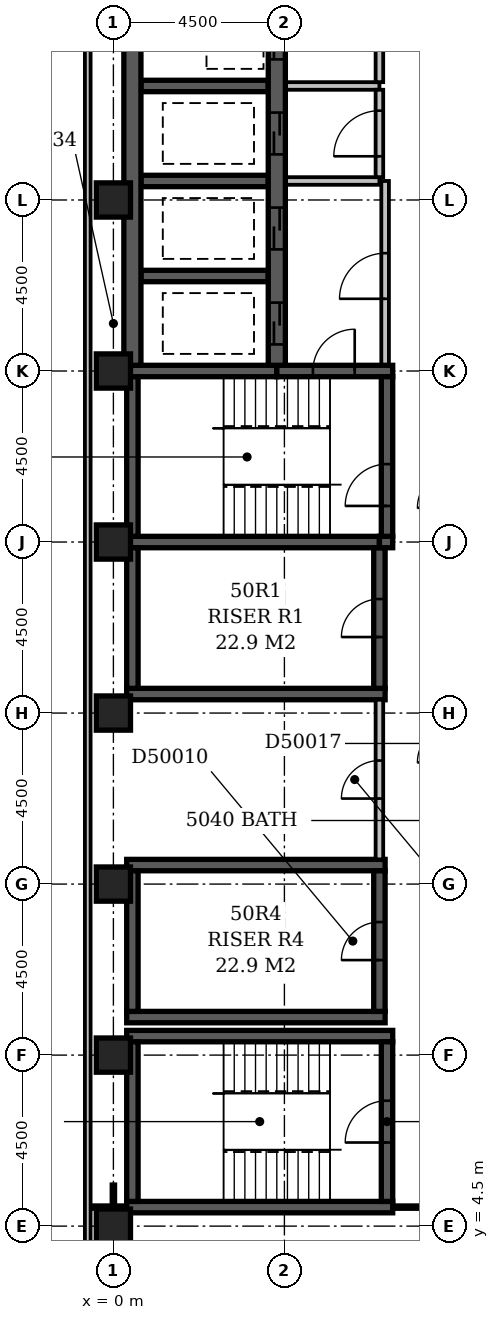
"""IFC4 building model, lengths in metres.
Left out: names, types, materials, properties, quantities, classifications, styles, units other than length and angle.
Written with IfcOpenShell. Run it as: python <this file> out.ifc"""

import sys

from ifc_helpers import new_model, si_unit, direction, frame, frame_2d, origin, origin_2d, place, context, subcontext, project, spatial, rectangle, extrude, element, fill, save


model = new_model("IFC4")
c1 = context("Model", 3, precision=1e-05, world=origin(), true_north=direction((0.0, 1.0)))
c2 = subcontext(c1, "Body", "Model", "MODEL_VIEW")
j1 = project(units=[si_unit("LENGTHUNIT", "METRE"), si_unit("PLANEANGLEUNIT", "RADIAN")], contexts=[c1])
p1 = place(None, origin())
s1 = spatial("IfcSite", under=j1, at=p1, CompositionType="ELEMENT")
p2 = place(p1, origin())
s2 = spatial("IfcBuilding", under=s1, at=p2, CompositionType="ELEMENT")
p3 = place(p2, frame((0.0, 0.0, 197.0)))
s3 = spatial("IfcBuildingStorey", under=s2, at=p3, CompositionType="ELEMENT", Elevation=197.0)
for number, where, z_axis, x_axis in (
    (1, (0.35, 5.0, -0.3), (0.0, 0.0, 1.0), (1.0, 0.0, 0.0)),
    (2, (0.35, 9.5, -0.3), (0.0, 0.0, 1.0), (1.0, 0.0, 0.0)),
):
    element("IfcWall", number, at=place(p3, frame(where, z_axis=z_axis, x_axis=x_axis)), inside=s3, PredefinedType="SHEAR", context=c2, shape_type="SweptSolid", body=[
        extrude(rectangle(XDim=7.0, YDim=0.3, at=frame_2d((3.5, 0.0))), origin(), (0.0, 0.0, 1.0), 3.6),
    ])
for number, where, z_axis, x_axis in (
    (3, (0.35, 10.0, -0.3), (0.0, 0.0, 1.0), (1.0, 0.0, 0.0)),
    (4, (0.35, 14.0, -0.3), (0.0, 0.0, 1.0), (1.0, 0.0, 0.0)),
    (5, (0.35, 18.5, -0.3), (0.0, 0.0, 1.0), (1.0, 0.0, 0.0)),
):
    element("IfcWall", number, at=place(p3, frame(where, z_axis=z_axis, x_axis=x_axis)), inside=s3, PredefinedType="SHEAR", context=c2, shape_type="SweptSolid", body=[
        extrude(rectangle(XDim=6.8, YDim=0.3, at=frame_2d((3.4, 0.0))), origin(), (0.0, 0.0, 1.0), 3.6),
    ])
p4 = place(p3, frame((0.35, 22.5, -0.3), z_axis=(0.0, 0.0, 1.0), x_axis=(1.0, 0.0, 0.0)))
e6 = element("IfcWall", 6, at=p4, inside=s3, PredefinedType="SHEAR", context=c2, shape_type="SweptSolid", body=[
    extrude(rectangle(XDim=6.65, YDim=0.3, at=frame_2d((3.325, 0.0))), origin(), (0.0, 0.0, 1.0), 3.6),
])
p5 = place(p3, frame((0.35, 27.0, -0.3), z_axis=(0.0, 0.0, 1.0), x_axis=(1.0, 0.0, 0.0)))
e7 = element("IfcWall", 7, at=p5, inside=s3, PredefinedType="SHEAR", context=c2, shape_type="SweptSolid", body=[
    extrude(rectangle(XDim=3.95, YDim=0.3, at=frame_2d((1.975, 0.0))), origin(), (0.0, 0.0, 1.0), 3.6),
])
p6 = place(p3, frame((0.5, 5.15, -0.3), z_axis=(0.0, 0.0, 1.0), x_axis=(0.0, 1.0, 0.0)))
e8 = element("IfcWall", 8, at=p6, inside=s3, PredefinedType="SHEAR", context=c2, shape_type="SweptSolid", body=[
    extrude(rectangle(XDim=4.2, YDim=0.3, at=frame_2d((2.1, 0.0))), origin(), (0.0, 0.0, 1.0), 3.6),
])
for number, where, z_axis, x_axis in (
    (9, (0.5, 10.15, -0.3), (0.0, 0.0, 1.0), (0.0, 1.0, 0.0)),
    (10, (0.5, 18.65, -0.3), (0.0, 0.0, 1.0), (0.0, 1.0, 0.0)),
):
    element("IfcWall", number, at=place(p3, frame(where, z_axis=z_axis, x_axis=x_axis)), inside=s3, PredefinedType="SHEAR", context=c2, shape_type="SweptSolid", body=[
        extrude(rectangle(XDim=3.7, YDim=0.3, at=frame_2d((1.85, 0.0))), origin(), (0.0, 0.0, 1.0), 3.6),
    ])
p7 = place(p3, frame((0.5, 22.65, -0.3), z_axis=(0.0, 0.0, 1.0), x_axis=(0.0, 1.0, 0.0)))
e11 = element("IfcWall", 11, at=p7, inside=s3, PredefinedType="SHEAR", context=c2, shape_type="SweptSolid", body=[
    extrude(rectangle(XDim=4.2, YDim=0.3, at=frame_2d((2.1, 0.0))), origin(), (0.0, 0.0, 1.0), 3.6),
])
p8 = place(p3, frame((0.5, 27.15, -0.3), z_axis=(0.0, 0.0, 1.0), x_axis=(0.0, 1.0, 0.0)))
e12 = element("IfcWall", 12, at=p8, inside=s3, PredefinedType="SHEAR", context=c2, shape_type="SweptSolid", body=[
    extrude(rectangle(XDim=22.125, YDim=0.45, at=frame_2d((11.062, 0.0))), origin(), (0.0, 0.0, 1.0), 3.6),
])
for number, where, z_axis, x_axis in (
    (13, (0.725, 29.5, -0.3), (0.0, 0.0, 1.0), (1.0, 0.0, 0.0)),
    (14, (0.725, 32.0, -0.3), (0.0, 0.0, 1.0), (1.0, 0.0, 0.0)),
    (15, (0.725, 34.5, -0.3), (0.0, 0.0, 1.0), (1.0, 0.0, 0.0)),
):
    element("IfcWall", number, at=place(p3, frame(where, z_axis=z_axis, x_axis=x_axis)), inside=s3, PredefinedType="SHEAR", context=c2, shape_type="SweptSolid", body=[
        extrude(rectangle(XDim=3.35, YDim=0.3, at=frame_2d((1.675, 0.0))), origin(), (0.0, 0.0, 1.0), 3.6),
    ])
p9 = place(p3, frame((4.3, 27.0, -0.3), z_axis=(0.0, 0.0, 1.0), x_axis=(1.0, 0.0, 0.0)))
e16 = element("IfcWall", 16, at=p9, inside=s3, PredefinedType="SHEAR", context=c2, shape_type="SweptSolid", body=[
    extrude(rectangle(XDim=3.05, YDim=0.3, at=frame_2d((1.525, 0.0))), origin(), (0.0, 0.0, 1.0), 3.6),
])
p10 = place(p9, frame((0.95, 0.0, 0.3)))
e17 = element("IfcOpeningElement", 17, at=p10, cuts=e16, PredefinedType="OPENING", context=c2, shape_type="SweptSolid", body=[
    extrude(rectangle(XDim=1.1, YDim=2.1, at=frame_2d((0.55, 1.05))), frame((0.0, 0.162, 0.0), z_axis=(0.0, -1.0, 0.0), x_axis=(1.0, 0.0, 0.0)), (0.0, 0.0, 1.0), 0.324),
])
p11 = place(p3, frame((4.3, 27.15, -0.3), z_axis=(0.0, 0.0, 1.0), x_axis=(0.0, 1.0, 0.0)))
e18 = element("IfcWall", 18, at=p11, inside=s3, PredefinedType="SHEAR", context=c2, shape_type="SweptSolid", body=[
    extrude(rectangle(XDim=22.125, YDim=0.45, at=frame_2d((11.062, 0.0))), origin(), (0.0, 0.0, 1.0), 3.6),
])
p12 = place(p11, frame((3.05, 0.0, 0.3)))
e19 = element("IfcOpeningElement", 19, at=p12, cuts=e18, PredefinedType="OPENING", context=c2, shape_type="SweptSolid", body=[
    extrude(rectangle(XDim=1.1, YDim=2.1, at=frame_2d((0.55, 1.05))), frame((0.0, 0.237, 0.0), z_axis=(0.0, -1.0, 0.0), x_axis=(1.0, 0.0, 0.0)), (0.0, 0.0, 1.0), 0.474),
])
p13 = place(p11, frame((0.55, 0.0, 0.3)))
e20 = element("IfcOpeningElement", 20, at=p13, cuts=e18, PredefinedType="OPENING", context=c2, shape_type="SweptSolid", body=[
    extrude(rectangle(XDim=1.1, YDim=2.1, at=frame_2d((0.55, 1.05))), frame((0.0, 0.237, 0.0), z_axis=(0.0, -1.0, 0.0), x_axis=(1.0, 0.0, 0.0)), (0.0, 0.0, 1.0), 0.474),
])
p14 = place(p11, frame((20.55, 0.0, 0.3)))
e21 = element("IfcOpeningElement", 21, at=p14, cuts=e18, PredefinedType="OPENING", context=c2, shape_type="SweptSolid", body=[
    extrude(rectangle(XDim=1.1, YDim=2.1, at=frame_2d((0.55, 1.05))), frame((0.0, 0.237, 0.0), z_axis=(0.0, -1.0, 0.0), x_axis=(1.0, 0.0, 0.0)), (0.0, 0.0, 1.0), 0.474),
])
p15 = place(p11, frame((18.05, 0.0, 0.3)))
e22 = element("IfcOpeningElement", 22, at=p15, cuts=e18, PredefinedType="OPENING", context=c2, shape_type="SweptSolid", body=[
    extrude(rectangle(XDim=1.1, YDim=2.1, at=frame_2d((0.55, 1.05))), frame((0.0, 0.237, 0.0), z_axis=(0.0, -1.0, 0.0), x_axis=(1.0, 0.0, 0.0)), (0.0, 0.0, 1.0), 0.474),
])
p16 = place(p11, frame((15.55, 0.0, 0.3)))
e23 = element("IfcOpeningElement", 23, at=p16, cuts=e18, PredefinedType="OPENING", context=c2, shape_type="SweptSolid", body=[
    extrude(rectangle(XDim=1.1, YDim=2.1, at=frame_2d((0.55, 1.05))), frame((0.0, 0.237, 0.0), z_axis=(0.0, -1.0, 0.0), x_axis=(1.0, 0.0, 0.0)), (0.0, 0.0, 1.0), 0.474),
])
p17 = place(p11, frame((13.05, 0.0, 0.3)))
e24 = element("IfcOpeningElement", 24, at=p17, cuts=e18, PredefinedType="OPENING", context=c2, shape_type="SweptSolid", body=[
    extrude(rectangle(XDim=1.1, YDim=2.1, at=frame_2d((0.55, 1.05))), frame((0.0, 0.237, 0.0), z_axis=(0.0, -1.0, 0.0), x_axis=(1.0, 0.0, 0.0)), (0.0, 0.0, 1.0), 0.474),
])
p18 = place(p11, frame((10.55, 0.0, 0.3)))
e25 = element("IfcOpeningElement", 25, at=p18, cuts=e18, PredefinedType="OPENING", context=c2, shape_type="SweptSolid", body=[
    extrude(rectangle(XDim=1.1, YDim=2.1, at=frame_2d((0.55, 1.05))), frame((0.0, 0.237, 0.0), z_axis=(0.0, -1.0, 0.0), x_axis=(1.0, 0.0, 0.0)), (0.0, 0.0, 1.0), 0.474),
])
p19 = place(p11, frame((8.05, 0.0, 0.3)))
e26 = element("IfcOpeningElement", 26, at=p19, cuts=e18, PredefinedType="OPENING", context=c2, shape_type="SweptSolid", body=[
    extrude(rectangle(XDim=1.1, YDim=2.1, at=frame_2d((0.55, 1.05))), frame((0.0, 0.237, 0.0), z_axis=(0.0, -1.0, 0.0), x_axis=(1.0, 0.0, 0.0)), (0.0, 0.0, 1.0), 0.474),
])
p20 = place(p11, frame((5.55, 0.0, 0.3)))
e27 = element("IfcOpeningElement", 27, at=p20, cuts=e18, PredefinedType="OPENING", context=c2, shape_type="SweptSolid", body=[
    extrude(rectangle(XDim=1.1, YDim=2.1, at=frame_2d((0.55, 1.05))), frame((0.0, 0.237, 0.0), z_axis=(0.0, -1.0, 0.0), x_axis=(1.0, 0.0, 0.0)), (0.0, 0.0, 1.0), 0.474),
])
p21 = place(p3, frame((7.0, 10.15, -0.3), z_axis=(0.0, 0.0, 1.0), x_axis=(0.0, 1.0, 0.0)))
e28 = element("IfcWall", 28, at=p21, inside=s3, PredefinedType="SHEAR", context=c2, shape_type="SweptSolid", body=[
    extrude(rectangle(XDim=3.7, YDim=0.3, at=frame_2d((1.85, 0.0))), origin(), (0.0, 0.0, 1.0), 3.6),
])
p22 = place(p21, frame((1.35, 0.0, 0.3)))
e29 = element("IfcOpeningElement", 29, at=p22, cuts=e28, PredefinedType="OPENING", context=c2, shape_type="SweptSolid", body=[
    extrude(rectangle(XDim=1.0, YDim=2.1, at=frame_2d((0.5, 1.05))), frame((0.0, 0.162, 0.0), z_axis=(0.0, -1.0, 0.0), x_axis=(1.0, 0.0, 0.0)), (0.0, 0.0, 1.0), 0.324),
])
p23 = place(p3, frame((7.0, 18.65, -0.3), z_axis=(0.0, 0.0, 1.0), x_axis=(0.0, 1.0, 0.0)))
e30 = element("IfcWall", 30, at=p23, inside=s3, PredefinedType="SHEAR", context=c2, shape_type="SweptSolid", body=[
    extrude(rectangle(XDim=3.7, YDim=0.3, at=frame_2d((1.85, 0.0))), origin(), (0.0, 0.0, 1.0), 3.6),
])
p24 = place(p23, frame((1.35, 0.0, 0.3)))
e31 = element("IfcOpeningElement", 31, at=p24, cuts=e30, PredefinedType="OPENING", context=c2, shape_type="SweptSolid", body=[
    extrude(rectangle(XDim=1.0, YDim=2.1, at=frame_2d((0.5, 1.05))), frame((0.0, 0.162, 0.0), z_axis=(0.0, -1.0, 0.0), x_axis=(1.0, 0.0, 0.0)), (0.0, 0.0, 1.0), 0.324),
])
p25 = place(p3, frame((7.0, 22.5, -0.3), z_axis=(0.0, 0.0, 1.0), x_axis=(1.0, 0.0, 0.0)))
e32 = element("IfcWall", 32, at=p25, inside=s3, PredefinedType="SHEAR", context=c2, shape_type="SweptSolid", body=[
    extrude(rectangle(XDim=0.35, YDim=0.3, at=frame_2d((0.175, 0.0))), origin(), (0.0, 0.0, 1.0), 3.6),
])
p26 = place(p3, frame((7.2, 5.15, -0.3), z_axis=(0.0, 0.0, 1.0), x_axis=(0.0, 1.0, 0.0)))
e33 = element("IfcWall", 33, at=p26, inside=s3, PredefinedType="SHEAR", context=c2, shape_type="SweptSolid", body=[
    extrude(rectangle(XDim=4.2, YDim=0.3, at=frame_2d((2.1, 0.0))), origin(), (0.0, 0.0, 1.0), 3.6),
])
p27 = place(p26, frame((1.55, 0.0, 0.3)))
e34 = element("IfcOpeningElement", 34, at=p27, cuts=e33, PredefinedType="OPENING", context=c2, shape_type="SweptSolid", body=[
    extrude(rectangle(XDim=1.1, YDim=2.1, at=frame_2d((0.55, 1.05))), frame((0.0, 0.162, 0.0), z_axis=(0.0, -1.0, 0.0), x_axis=(1.0, 0.0, 0.0)), (0.0, 0.0, 1.0), 0.324),
])
p28 = place(p3, frame((7.2, 22.65, -0.3), z_axis=(0.0, 0.0, 1.0), x_axis=(0.0, 1.0, 0.0)))
e35 = element("IfcWall", 35, at=p28, inside=s3, PredefinedType="SHEAR", context=c2, shape_type="SweptSolid", body=[
    extrude(rectangle(XDim=4.2, YDim=0.3, at=frame_2d((2.1, 0.0))), origin(), (0.0, 0.0, 1.0), 3.6),
])
p29 = place(p28, frame((0.8, 0.0, 0.3)))
e36 = element("IfcOpeningElement", 36, at=p29, cuts=e35, PredefinedType="OPENING", context=c2, shape_type="SweptSolid", body=[
    extrude(rectangle(XDim=1.1, YDim=2.1, at=frame_2d((0.55, 1.05))), frame((0.0, 0.162, 0.0), z_axis=(0.0, -1.0, 0.0), x_axis=(1.0, 0.0, 0.0)), (0.0, 0.0, 1.0), 0.324),
])
for number, where, z_axis, x_axis in (
    (37, (0.0, 4.5, -0.3), (0.0, 0.0, 1.0), (1.0, 0.0, 0.0)),
    (38, (0.0, 9.0, -0.3), (0.0, 0.0, 1.0), (1.0, 0.0, 0.0)),
    (39, (0.0, 13.5, -0.3), (0.0, 0.0, 1.0), (1.0, 0.0, 0.0)),
    (40, (0.0, 18.0, -0.3), (0.0, 0.0, 1.0), (1.0, 0.0, 0.0)),
    (41, (0.0, 22.5, -0.3), (0.0, 0.0, 1.0), (1.0, 0.0, 0.0)),
    (42, (0.0, 27.0, -0.3), (0.0, 0.0, 1.0), (1.0, 0.0, 0.0)),
    (43, (0.0, 31.5, -0.3), (0.0, 0.0, 1.0), (1.0, 0.0, 0.0)),
):
    element("IfcColumn", number, at=place(p3, frame(where, z_axis=z_axis, x_axis=x_axis)), inside=s3, PredefinedType="COLUMN", context=c2, shape_type="SweptSolid", body=[
        extrude(rectangle(XDim=0.9, YDim=0.9, at=origin_2d()), origin(), (0.0, 0.0, 1.0), 3.6),
    ])
p30 = place(p3, frame((-0.675, 59.1, 0.0), z_axis=(0.0, 0.0, 1.0), x_axis=(0.0, -1.0, 0.0)))
e44 = element("IfcWall", 44, at=p30, inside=s3, PredefinedType="STANDARD", context=c2, shape_type="SweptSolid", body=[
    extrude(rectangle(XDim=55.35, YDim=0.15, at=frame_2d((27.675, 0.0))), origin(), (0.0, 0.0, 1.0), 2.7),
])
p31 = place(p3, frame((4.545, 34.5, 0.0), z_axis=(0.0, 0.0, 1.0), x_axis=(1.0, 0.0, 0.0)))
e45 = element("IfcWall", 45, at=p31, inside=s3, PredefinedType="PARTITIONING", context=c2, shape_type="SweptSolid", body=[
    extrude(rectangle(XDim=2.455, YDim=0.2, at=frame_2d((1.228, 0.0))), origin(), (0.0, 0.0, 1.0), 3.3),
])
p32 = place(p3, frame((7.0, 34.6, 0.0), z_axis=(0.0, 0.0, 1.0), x_axis=(0.0, 1.0, 0.0)))
e46 = element("IfcWall", 46, at=p32, inside=s3, PredefinedType="PARTITIONING", context=c2, shape_type="SweptSolid", body=[
    extrude(rectangle(XDim=14.9, YDim=0.2, at=frame_2d((7.45, 0.0))), origin(), (0.0, 0.0, 1.0), 3.3),
])
p33 = place(p32, frame((2.8, 0.0, 0.0)))
e47 = element("IfcOpeningElement", 47, at=p33, cuts=e46, PredefinedType="OPENING", context=c2, shape_type="SweptSolid", body=[
    extrude(rectangle(XDim=1.2, YDim=2.1, at=frame_2d((0.6, 1.05))), frame((0.0, 0.112, 0.0), z_axis=(0.0, -1.0, 0.0), x_axis=(1.0, 0.0, 0.0)), (0.0, 0.0, 1.0), 0.224),
])
p34 = place(p32, frame((9.8, 0.0, 0.0)))
e48 = element("IfcOpeningElement", 48, at=p34, cuts=e46, PredefinedType="OPENING", context=c2, shape_type="SweptSolid", body=[
    extrude(rectangle(XDim=1.2, YDim=2.1, at=frame_2d((0.6, 1.05))), frame((0.0, 0.112, 0.0), z_axis=(0.0, -1.0, 0.0), x_axis=(1.0, 0.0, 0.0)), (0.0, 0.0, 1.0), 0.224),
])
p35 = place(p3, frame((4.545, 32.0, 0.0), z_axis=(0.0, 0.0, 1.0), x_axis=(1.0, 0.0, 0.0)))
e49 = element("IfcWall", 49, at=p35, inside=s3, PredefinedType="PARTITIONING", context=c2, shape_type="SweptSolid", body=[
    extrude(rectangle(XDim=2.455, YDim=0.2, at=frame_2d((1.228, 0.0))), origin(), (0.0, 0.0, 1.0), 3.3),
])
p36 = place(p3, frame((7.0, 32.1, 0.0), z_axis=(0.0, 0.0, 1.0), x_axis=(0.0, 1.0, 0.0)))
e50 = element("IfcWall", 50, at=p36, inside=s3, PredefinedType="PARTITIONING", context=c2, shape_type="SweptSolid", body=[
    extrude(rectangle(XDim=2.3, YDim=0.2, at=frame_2d((1.15, 0.0))), origin(), (0.0, 0.0, 1.0), 3.3),
])
p37 = place(p36, frame((0.55, 0.0, 0.0)))
e51 = element("IfcOpeningElement", 51, at=p37, cuts=e50, PredefinedType="OPENING", context=c2, shape_type="SweptSolid", body=[
    extrude(rectangle(XDim=1.2, YDim=2.1, at=frame_2d((0.6, 1.05))), frame((0.0, 0.112, 0.0), z_axis=(0.0, -1.0, 0.0), x_axis=(1.0, 0.0, 0.0)), (0.0, 0.0, 1.0), 0.224),
])
p38 = place(p3, frame((7.15, 27.17, 0.0), z_axis=(0.0, 0.0, 1.0), x_axis=(0.0, 1.0, 0.0)))
e52 = element("IfcWall", 52, at=p38, inside=s3, PredefinedType="PARTITIONING", context=c2, shape_type="SweptSolid", body=[
    extrude(rectangle(XDim=4.83, YDim=0.2, at=frame_2d((2.415, 0.0))), origin(), (0.0, 0.0, 1.0), 3.3),
])
p39 = place(p38, frame((1.73, 0.0, 0.0)))
e53 = element("IfcOpeningElement", 53, at=p39, cuts=e52, PredefinedType="OPENING", context=c2, shape_type="SweptSolid", body=[
    extrude(rectangle(XDim=1.2, YDim=2.1, at=frame_2d((0.6, 1.05))), frame((0.0, 0.112, 0.0), z_axis=(0.0, -1.0, 0.0), x_axis=(1.0, 0.0, 0.0)), (0.0, 0.0, 1.0), 0.224),
])
p40 = place(p3, frame((0.0, 4.95, 0.0), z_axis=(0.0, 0.0, 1.0), x_axis=(0.0, 1.0, 0.0)))
e54 = element("IfcWall", 54, at=p40, inside=s3, PredefinedType="PARTITIONING", context=c2, shape_type="SweptSolid", body=[
    extrude(rectangle(XDim=0.65, YDim=0.1, at=frame_2d((0.325, 0.0))), origin(), (0.0, 0.0, 1.0), 2.7),
])
p41 = place(p3, frame((-0.6, 5.0, 0.0), z_axis=(0.0, 0.0, 1.0), x_axis=(1.0, 0.0, 0.0)))
e55 = element("IfcWall", 55, at=p41, inside=s3, PredefinedType="PARTITIONING", context=c2, shape_type="SweptSolid", body=[
    extrude(rectangle(XDim=0.951, YDim=0.1, at=frame_2d((0.476, 0.0))), origin(), (0.0, 0.0, 1.0), 3.3),
])
p42 = place(p3, frame((7.349, 5.0, 0.0), z_axis=(0.0, 0.0, 1.0), x_axis=(1.0, 0.0, 0.0)))
e56 = element("IfcWall", 56, at=p42, inside=s3, PredefinedType="PARTITIONING", context=c2, shape_type="SweptSolid", body=[
    extrude(rectangle(XDim=1.551, YDim=0.1, at=frame_2d((0.775, 0.0))), origin(), (0.0, 0.0, 1.0), 3.3),
])
p43 = place(p3, frame((7.0, 14.15, 0.0), z_axis=(0.0, 0.0, 1.0), x_axis=(0.0, 1.0, 0.0)))
e57 = element("IfcWall", 57, at=p43, inside=s3, PredefinedType="PARTITIONING", context=c2, shape_type="SweptSolid", body=[
    extrude(rectangle(XDim=4.2, YDim=0.2, at=frame_2d((2.1, 0.0))), origin(), (0.0, 0.0, 1.0), 3.3),
])
p44 = place(p43, frame((1.6, 0.0, 0.0)))
e58 = element("IfcOpeningElement", 58, at=p44, cuts=e57, PredefinedType="OPENING", context=c2, shape_type="SweptSolid", body=[
    extrude(rectangle(XDim=1.0, YDim=2.1, at=frame_2d((0.5, 1.05))), frame((0.0, 0.112, 0.0), z_axis=(0.0, -1.0, 0.0), x_axis=(1.0, 0.0, 0.0)), (0.0, 0.0, 1.0), 0.224),
])
p45 = place(p39, origin())
e59 = element("IfcDoor", 59, at=p45, inside=s3, OperationType="SINGLE_SWING_LEFT", PredefinedType="DOOR", context=c2, shape_type="SweptSolid", body=[
    extrude(rectangle(XDim=1.2, YDim=2.1, at=frame_2d((0.6, 1.05))), frame((0.0, 0.025, 0.0), z_axis=(0.0, -1.0, 0.0), x_axis=(1.0, 0.0, 0.0)), (0.0, 0.0, 1.0), 0.05),
])
fill(e53, e59)
p46 = place(p12, origin())
e60 = element("IfcDoor", 60, at=p46, inside=s3, OperationType="SLIDING_TO_LEFT", PredefinedType="DOOR", context=c2, shape_type="SweptSolid", body=[
    extrude(rectangle(XDim=1.1, YDim=2.1, at=frame_2d((0.55, 1.05))), frame((0.0, 0.025, 0.0), z_axis=(0.0, -1.0, 0.0), x_axis=(1.0, 0.0, 0.0)), (0.0, 0.0, 1.0), 0.05),
])
fill(e19, e60)
p47 = place(p13, origin())
e61 = element("IfcDoor", 61, at=p47, inside=s3, OperationType="SLIDING_TO_LEFT", PredefinedType="DOOR", context=c2, shape_type="SweptSolid", body=[
    extrude(rectangle(XDim=1.1, YDim=2.1, at=frame_2d((0.55, 1.05))), frame((0.0, 0.025, 0.0), z_axis=(0.0, -1.0, 0.0), x_axis=(1.0, 0.0, 0.0)), (0.0, 0.0, 1.0), 0.05),
])
fill(e20, e61)
p48 = place(p19, origin())
e62 = element("IfcDoor", 62, at=p48, inside=s3, OperationType="SLIDING_TO_LEFT", PredefinedType="DOOR", context=c2, shape_type="SweptSolid", body=[
    extrude(rectangle(XDim=1.1, YDim=2.1, at=frame_2d((0.55, 1.05))), frame((0.0, 0.025, 0.0), z_axis=(0.0, -1.0, 0.0), x_axis=(1.0, 0.0, 0.0)), (0.0, 0.0, 1.0), 0.05),
])
fill(e26, e62)
p49 = place(p37, origin())
e63 = element("IfcDoor", 63, at=p49, inside=s3, OperationType="SINGLE_SWING_LEFT", PredefinedType="DOOR", context=c2, shape_type="SweptSolid", body=[
    extrude(rectangle(XDim=1.2, YDim=2.1, at=frame_2d((0.6, 1.05))), frame((0.0, 0.025, 0.0), z_axis=(0.0, -1.0, 0.0), x_axis=(1.0, 0.0, 0.0)), (0.0, 0.0, 1.0), 0.05),
])
fill(e51, e63)
p50 = place(p20, origin())
e64 = element("IfcDoor", 64, at=p50, inside=s3, OperationType="SLIDING_TO_LEFT", PredefinedType="DOOR", context=c2, shape_type="SweptSolid", body=[
    extrude(rectangle(XDim=1.1, YDim=2.1, at=frame_2d((0.55, 1.05))), frame((0.0, 0.025, 0.0), z_axis=(0.0, -1.0, 0.0), x_axis=(1.0, 0.0, 0.0)), (0.0, 0.0, 1.0), 0.05),
])
fill(e27, e64)
p51 = place(p24, origin())
e65 = element("IfcDoor", 65, at=p51, inside=s3, OperationType="SINGLE_SWING_LEFT", PredefinedType="DOOR", context=c2, shape_type="SweptSolid", body=[
    extrude(rectangle(XDim=1.0, YDim=2.1, at=frame_2d((0.5, 1.05))), frame((0.0, 0.025, 0.0), z_axis=(0.0, -1.0, 0.0), x_axis=(1.0, 0.0, 0.0)), (0.0, 0.0, 1.0), 0.05),
])
fill(e31, e65)
p52 = place(p22, origin())
e66 = element("IfcDoor", 66, at=p52, inside=s3, OperationType="SINGLE_SWING_LEFT", PredefinedType="DOOR", context=c2, shape_type="SweptSolid", body=[
    extrude(rectangle(XDim=1.0, YDim=2.1, at=frame_2d((0.5, 1.05))), frame((0.0, 0.025, 0.0), z_axis=(0.0, -1.0, 0.0), x_axis=(1.0, 0.0, 0.0)), (0.0, 0.0, 1.0), 0.05),
])
fill(e29, e66)
p53 = place(p10, frame((1.1, 0.0, 0.0), z_axis=(0.0, 0.0, 1.0), x_axis=(-1.0, 0.0, 0.0)))
e67 = element("IfcDoor", 67, at=p53, inside=s3, OperationType="SINGLE_SWING_LEFT", PredefinedType="DOOR", context=c2, shape_type="SweptSolid", body=[
    extrude(rectangle(XDim=1.1, YDim=2.1, at=frame_2d((0.55, 1.05))), frame((0.0, 0.025, 0.0), z_axis=(0.0, -1.0, 0.0), x_axis=(1.0, 0.0, 0.0)), (0.0, 0.0, 1.0), 0.05),
])
fill(e17, e67)
p54 = place(p29, origin())
e68 = element("IfcDoor", 68, at=p54, inside=s3, OperationType="SINGLE_SWING_LEFT", PredefinedType="DOOR", context=c2, shape_type="SweptSolid", body=[
    extrude(rectangle(XDim=1.1, YDim=2.1, at=frame_2d((0.55, 1.05))), frame((0.0, 0.025, 0.0), z_axis=(0.0, -1.0, 0.0), x_axis=(1.0, 0.0, 0.0)), (0.0, 0.0, 1.0), 0.05),
])
fill(e36, e68)
p55 = place(p27, origin())
e69 = element("IfcDoor", 69, at=p55, inside=s3, OperationType="SINGLE_SWING_LEFT", PredefinedType="DOOR", context=c2, shape_type="SweptSolid", body=[
    extrude(rectangle(XDim=1.1, YDim=2.1, at=frame_2d((0.55, 1.05))), frame((0.0, 0.025, 0.0), z_axis=(0.0, -1.0, 0.0), x_axis=(1.0, 0.0, 0.0)), (0.0, 0.0, 1.0), 0.05),
])
fill(e34, e69)
p56 = place(p44, origin())
e70 = element("IfcDoor", 70, at=p56, inside=s3, OperationType="SINGLE_SWING_LEFT", PredefinedType="DOOR", context=c2, shape_type="SweptSolid", body=[
    extrude(rectangle(XDim=1.0, YDim=2.1, at=frame_2d((0.5, 1.05))), frame((0.0, 0.025, 0.0), z_axis=(0.0, -1.0, 0.0), x_axis=(1.0, 0.0, 0.0)), (0.0, 0.0, 1.0), 0.05),
])
fill(e58, e70)
save(model, sys.argv[1])
